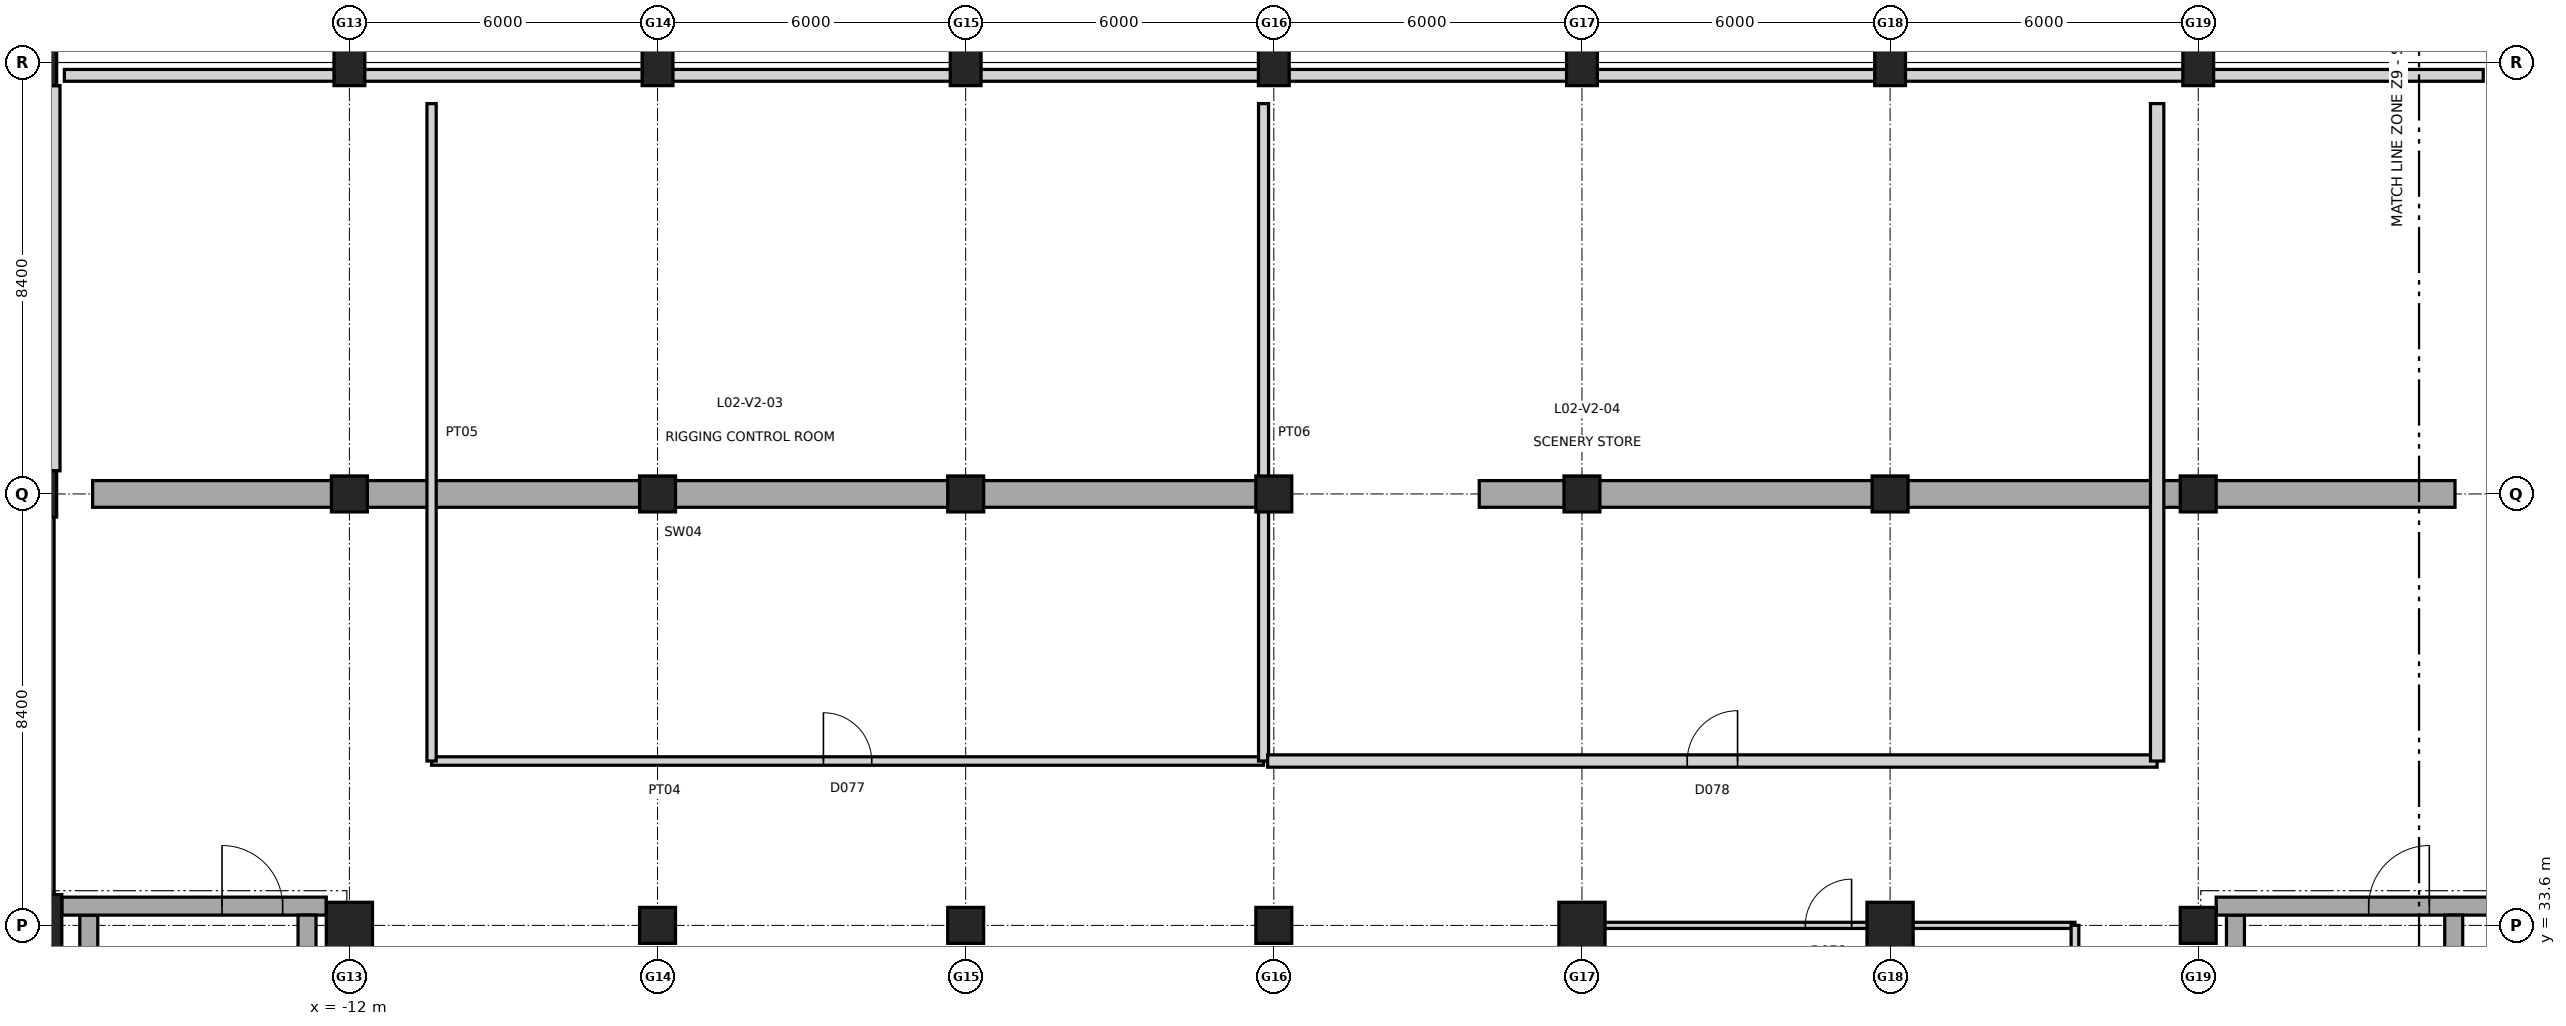
"""IFC4 building model, lengths in metres.
Left out: names, types, materials, properties, quantities, classifications, styles, units other than length and angle.
Written with IfcOpenShell. Run it as: python <this file> out.ifc"""

import sys

from ifc_helpers import new_model, si_unit, direction, frame, frame_2d, origin, origin_2d, place, context, subcontext, project, spatial, rectangle, extrude, element, fill, save


model = new_model("IFC4")
c1 = context("Model", 3, precision=1e-05, world=origin(), true_north=direction((0.0, 1.0)))
c2 = subcontext(c1, "Body", "Model", "MODEL_VIEW")
j1 = project(units=[si_unit("LENGTHUNIT", "METRE"), si_unit("PLANEANGLEUNIT", "RADIAN")], contexts=[c1])
p1 = place(None, origin())
s1 = spatial("IfcSite", under=j1, at=p1, CompositionType="ELEMENT")
p2 = place(p1, origin())
s2 = spatial("IfcBuilding", under=s1, at=p2, CompositionType="ELEMENT")
p3 = place(p2, frame((0.0, 0.0, 10.2)))
s3 = spatial("IfcBuildingStorey", under=s2, at=p3, CompositionType="ELEMENT", Elevation=10.2)
p4 = place(p3, frame((-18.0, 33.6, 0.0), z_axis=(0.0, 0.0, 1.0), x_axis=(1.0, 0.0, 0.0)))
e1 = element("IfcColumn", 1, at=p4, inside=s3, PredefinedType="COLUMN", context=c2, shape_type="SweptSolid", body=[
    extrude(rectangle(XDim=0.8, YDim=1.2, at=origin_2d()), origin(), (0.0, 0.0, 1.0), 4.8),
])
for number, where, z_axis, x_axis in (
    (2, (-18.0, 42.0, 0.0), (0.0, 0.0, 1.0), (1.0, 0.0, 0.0)),
    (3, (-18.0, 50.4, 0.0), (0.0, 0.0, 1.0), (1.0, 0.0, 0.0)),
):
    element("IfcColumn", number, at=place(p3, frame(where, z_axis=z_axis, x_axis=x_axis)), inside=s3, PredefinedType="COLUMN", context=c2, shape_type="SweptSolid", body=[
        extrude(rectangle(XDim=0.6, YDim=0.9, at=origin_2d()), origin(), (0.0, 0.0, 1.0), 4.8),
    ])
p5 = place(p3, frame((-12.0, 33.6, 0.0), z_axis=(0.0, 0.0, 1.0), x_axis=(1.0, 0.0, 0.0)))
e4 = element("IfcColumn", 4, at=p5, inside=s3, PredefinedType="COLUMN", context=c2, shape_type="SweptSolid", body=[
    extrude(rectangle(XDim=0.9, YDim=0.9, at=origin_2d()), origin(), (0.0, 0.0, 1.0), 4.8),
])
p6 = place(p3, frame((-12.0, 42.0, 0.0), z_axis=(0.0, 0.0, 1.0), x_axis=(1.0, 0.0, 0.0)))
e5 = element("IfcColumn", 5, at=p6, inside=s3, PredefinedType="COLUMN", context=c2, shape_type="SweptSolid", body=[
    extrude(rectangle(XDim=0.7, YDim=0.7, at=origin_2d()), origin(), (0.0, 0.0, 1.0), 4.8),
])
p7 = place(p3, frame((-12.0, 50.4, 0.0), z_axis=(0.0, 0.0, 1.0), x_axis=(1.0, 0.0, 0.0)))
e6 = element("IfcColumn", 6, at=p7, inside=s3, PredefinedType="COLUMN", context=c2, shape_type="SweptSolid", body=[
    extrude(rectangle(XDim=0.6, YDim=0.9, at=origin_2d()), origin(), (0.0, 0.0, 1.0), 4.8),
])
for number, where, z_axis, x_axis in (
    (7, (-6.0, 33.6, 0.0), (0.0, 0.0, 1.0), (1.0, 0.0, 0.0)),
    (8, (-6.0, 42.0, 0.0), (0.0, 0.0, 1.0), (1.0, 0.0, 0.0)),
):
    element("IfcColumn", number, at=place(p3, frame(where, z_axis=z_axis, x_axis=x_axis)), inside=s3, PredefinedType="COLUMN", context=c2, shape_type="SweptSolid", body=[
        extrude(rectangle(XDim=0.7, YDim=0.7, at=origin_2d()), origin(), (0.0, 0.0, 1.0), 4.8),
    ])
p8 = place(p3, frame((-6.0, 50.4, 0.0), z_axis=(0.0, 0.0, 1.0), x_axis=(1.0, 0.0, 0.0)))
e9 = element("IfcColumn", 9, at=p8, inside=s3, PredefinedType="COLUMN", context=c2, shape_type="SweptSolid", body=[
    extrude(rectangle(XDim=0.6, YDim=0.9, at=origin_2d()), origin(), (0.0, 0.0, 1.0), 4.8),
])
for number, where, z_axis, x_axis in (
    (10, (0.0, 33.6, 0.0), (0.0, 0.0, 1.0), (1.0, 0.0, 0.0)),
    (11, (0.0, 42.0, 0.0), (0.0, 0.0, 1.0), (1.0, 0.0, 0.0)),
):
    element("IfcColumn", number, at=place(p3, frame(where, z_axis=z_axis, x_axis=x_axis)), inside=s3, PredefinedType="COLUMN", context=c2, shape_type="SweptSolid", body=[
        extrude(rectangle(XDim=0.7, YDim=0.7, at=origin_2d()), origin(), (0.0, 0.0, 1.0), 4.8),
    ])
p9 = place(p3, frame((0.0, 50.4, 0.0), z_axis=(0.0, 0.0, 1.0), x_axis=(1.0, 0.0, 0.0)))
e12 = element("IfcColumn", 12, at=p9, inside=s3, PredefinedType="COLUMN", context=c2, shape_type="SweptSolid", body=[
    extrude(rectangle(XDim=0.6, YDim=0.9, at=origin_2d()), origin(), (0.0, 0.0, 1.0), 4.8),
])
for number, where, z_axis, x_axis in (
    (13, (6.0, 33.6, 0.0), (0.0, 0.0, 1.0), (1.0, 0.0, 0.0)),
    (14, (6.0, 42.0, 0.0), (0.0, 0.0, 1.0), (1.0, 0.0, 0.0)),
):
    element("IfcColumn", number, at=place(p3, frame(where, z_axis=z_axis, x_axis=x_axis)), inside=s3, PredefinedType="COLUMN", context=c2, shape_type="SweptSolid", body=[
        extrude(rectangle(XDim=0.7, YDim=0.7, at=origin_2d()), origin(), (0.0, 0.0, 1.0), 4.8),
    ])
p10 = place(p3, frame((6.0, 50.4, 0.0), z_axis=(0.0, 0.0, 1.0), x_axis=(1.0, 0.0, 0.0)))
e15 = element("IfcColumn", 15, at=p10, inside=s3, PredefinedType="COLUMN", context=c2, shape_type="SweptSolid", body=[
    extrude(rectangle(XDim=0.6, YDim=0.9, at=origin_2d()), origin(), (0.0, 0.0, 1.0), 4.8),
])
p11 = place(p3, frame((12.0, 33.6, 0.0), z_axis=(0.0, 0.0, 1.0), x_axis=(1.0, 0.0, 0.0)))
e16 = element("IfcColumn", 16, at=p11, inside=s3, PredefinedType="COLUMN", context=c2, shape_type="SweptSolid", body=[
    extrude(rectangle(XDim=0.9, YDim=0.9, at=origin_2d()), origin(), (0.0, 0.0, 1.0), 4.8),
])
p12 = place(p3, frame((12.0, 42.0, 0.0), z_axis=(0.0, 0.0, 1.0), x_axis=(1.0, 0.0, 0.0)))
e17 = element("IfcColumn", 17, at=p12, inside=s3, PredefinedType="COLUMN", context=c2, shape_type="SweptSolid", body=[
    extrude(rectangle(XDim=0.7, YDim=0.7, at=origin_2d()), origin(), (0.0, 0.0, 1.0), 4.8),
])
p13 = place(p3, frame((12.0, 50.4, 0.0), z_axis=(0.0, 0.0, 1.0), x_axis=(1.0, 0.0, 0.0)))
e18 = element("IfcColumn", 18, at=p13, inside=s3, PredefinedType="COLUMN", context=c2, shape_type="SweptSolid", body=[
    extrude(rectangle(XDim=0.6, YDim=0.9, at=origin_2d()), origin(), (0.0, 0.0, 1.0), 4.8),
])
p14 = place(p3, frame((18.0, 33.6, 0.0), z_axis=(0.0, 0.0, 1.0), x_axis=(1.0, 0.0, 0.0)))
e19 = element("IfcColumn", 19, at=p14, inside=s3, PredefinedType="COLUMN", context=c2, shape_type="SweptSolid", body=[
    extrude(rectangle(XDim=0.9, YDim=0.9, at=origin_2d()), origin(), (0.0, 0.0, 1.0), 4.8),
])
p15 = place(p3, frame((18.0, 42.0, 0.0), z_axis=(0.0, 0.0, 1.0), x_axis=(1.0, 0.0, 0.0)))
e20 = element("IfcColumn", 20, at=p15, inside=s3, PredefinedType="COLUMN", context=c2, shape_type="SweptSolid", body=[
    extrude(rectangle(XDim=0.7, YDim=0.7, at=origin_2d()), origin(), (0.0, 0.0, 1.0), 4.8),
])
p16 = place(p3, frame((18.0, 50.4, 0.0), z_axis=(0.0, 0.0, 1.0), x_axis=(1.0, 0.0, 0.0)))
e21 = element("IfcColumn", 21, at=p16, inside=s3, PredefinedType="COLUMN", context=c2, shape_type="SweptSolid", body=[
    extrude(rectangle(XDim=0.6, YDim=0.9, at=origin_2d()), origin(), (0.0, 0.0, 1.0), 4.8),
])
for number, where, z_axis, x_axis in (
    (22, (24.0, 33.6, 0.0), (0.0, 0.0, 1.0), (1.0, 0.0, 0.0)),
    (23, (24.0, 42.0, 0.0), (0.0, 0.0, 1.0), (1.0, 0.0, 0.0)),
):
    element("IfcColumn", number, at=place(p3, frame(where, z_axis=z_axis, x_axis=x_axis)), inside=s3, PredefinedType="COLUMN", context=c2, shape_type="SweptSolid", body=[
        extrude(rectangle(XDim=0.7, YDim=0.7, at=origin_2d()), origin(), (0.0, 0.0, 1.0), 4.8),
    ])
p17 = place(p3, frame((24.0, 50.4, 0.0), z_axis=(0.0, 0.0, 1.0), x_axis=(1.0, 0.0, 0.0)))
e24 = element("IfcColumn", 24, at=p17, inside=s3, PredefinedType="COLUMN", context=c2, shape_type="SweptSolid", body=[
    extrude(rectangle(XDim=0.6, YDim=0.9, at=origin_2d()), origin(), (0.0, 0.0, 1.0), 4.8),
])
p18 = place(p3, frame((-18.0, 18.0, 0.0), z_axis=(0.0, 0.0, 1.0), x_axis=(0.0, 1.0, 0.0)))
e25 = element("IfcWall", 25, at=p18, inside=s3, PredefinedType="SHEAR", context=c2, shape_type="SweptSolid", body=[
    extrude(rectangle(XDim=31.95, YDim=0.5, at=frame_2d((15.975, 0.0))), origin(), (0.0, 0.0, 1.0), 4.8),
])
p19 = place(p3, frame((-17.0, 42.0, 0.0), z_axis=(0.0, 0.0, 1.0), x_axis=(1.0, 0.0, 0.0)))
e26 = element("IfcWall", 26, at=p19, inside=s3, PredefinedType="SHEAR", context=c2, shape_type="SweptSolid", body=[
    extrude(rectangle(XDim=23.0, YDim=0.52, at=frame_2d((11.5, 0.0))), origin(), (0.0, 0.0, 1.0), 4.8),
])
p20 = place(p3, frame((10.0, 42.0, 0.0), z_axis=(0.0, 0.0, 1.0), x_axis=(1.0, 0.0, 0.0)))
e27 = element("IfcWall", 27, at=p20, inside=s3, PredefinedType="SHEAR", context=c2, shape_type="SweptSolid", body=[
    extrude(rectangle(XDim=19.0, YDim=0.52, at=frame_2d((9.5, 0.0))), origin(), (0.0, 0.0, 1.0), 4.8),
])
p21 = place(p3, frame((29.55, 50.15, 4.8), z_axis=(0.0, 0.0, 1.0), x_axis=(-1.0, 0.0, 0.0)))
e28 = element("IfcWall", 28, at=p21, inside=s3, PredefinedType="PARAPET", context=c2, shape_type="SweptSolid", body=[
    extrude(rectangle(XDim=47.1, YDim=0.23, at=frame_2d((23.55, 0.0))), origin(), (0.0, 0.0, 1.0), 1.15),
])
p22 = place(p3, frame((-17.75, 49.95, 4.8), z_axis=(0.0, 0.0, 1.0), x_axis=(0.0, -1.0, 0.0)))
e29 = element("IfcWall", 29, at=p22, inside=s3, PredefinedType="PARAPET", context=c2, shape_type="SweptSolid", body=[
    extrude(rectangle(XDim=7.5, YDim=0.23, at=frame_2d((3.75, 0.0))), origin(), (0.0, 0.0, 1.0), 1.15),
])
p23 = place(p3, frame((-17.075, 25.5, 0.0), z_axis=(0.0, 0.0, 1.0), x_axis=(0.0, 1.0, 0.0)))
e30 = element("IfcWall", 30, at=p23, inside=s3, PredefinedType="SHEAR", context=c2, shape_type="SweptSolid", body=[
    extrude(rectangle(XDim=8.3, YDim=0.35, at=frame_2d((4.15, 0.0))), origin(), (0.0, 0.0, 1.0), 4.8),
])
p24 = place(p3, frame((-17.6, 33.975, 0.0), z_axis=(0.0, 0.0, 1.0), x_axis=(1.0, 0.0, 0.0)))
e31 = element("IfcWall", 31, at=p24, inside=s3, PredefinedType="SHEAR", context=c2, shape_type="SweptSolid", body=[
    extrude(rectangle(XDim=5.15, YDim=0.35, at=frame_2d((2.575, 0.0))), origin(), (0.0, 0.0, 1.0), 4.8),
])
p25 = place(p24, frame((3.12, 0.0, 0.0)))
e32 = element("IfcOpeningElement", 32, at=p25, cuts=e31, PredefinedType="OPENING", context=c2, shape_type="SweptSolid", body=[
    extrude(rectangle(XDim=1.18, YDim=2.15, at=frame_2d((0.59, 1.075))), frame((0.0, 0.185, 0.0), z_axis=(0.0, -1.0, 0.0), x_axis=(1.0, 0.0, 0.0)), (0.0, 0.0, 1.0), 0.37),
])
for number, where, z_axis, x_axis in (
    (33, (-12.825, 33.8, 0.0), (0.0, 0.0, 1.0), (0.0, -1.0, 0.0)),
    (34, (24.725, 25.5, 0.0), (0.0, 0.0, 1.0), (0.0, 1.0, 0.0)),
):
    element("IfcWall", number, at=place(p3, frame(where, z_axis=z_axis, x_axis=x_axis)), inside=s3, PredefinedType="SHEAR", context=c2, shape_type="SweptSolid", body=[
        extrude(rectangle(XDim=8.3, YDim=0.35, at=frame_2d((4.15, 0.0))), origin(), (0.0, 0.0, 1.0), 4.8),
    ])
p26 = place(p3, frame((24.35, 33.975, 0.0), z_axis=(0.0, 0.0, 1.0), x_axis=(1.0, 0.0, 0.0)))
e35 = element("IfcWall", 35, at=p26, inside=s3, PredefinedType="SHEAR", context=c2, shape_type="SweptSolid", body=[
    extrude(rectangle(XDim=5.35, YDim=0.35, at=frame_2d((2.675, 0.0))), origin(), (0.0, 0.0, 1.0), 4.8),
])
p27 = place(p26, frame((2.97, 0.0, 0.0)))
e36 = element("IfcOpeningElement", 36, at=p27, cuts=e35, PredefinedType="OPENING", context=c2, shape_type="SweptSolid", body=[
    extrude(rectangle(XDim=1.18, YDim=2.15, at=frame_2d((0.59, 1.075))), frame((0.0, 0.185, 0.0), z_axis=(0.0, -1.0, 0.0), x_axis=(1.0, 0.0, 0.0)), (0.0, 0.0, 1.0), 0.37),
])
p28 = place(p3, frame((28.975, 33.8, 0.0), z_axis=(0.0, 0.0, 1.0), x_axis=(0.0, -1.0, 0.0)))
e37 = element("IfcWall", 37, at=p28, inside=s3, PredefinedType="SHEAR", context=c2, shape_type="SweptSolid", body=[
    extrude(rectangle(XDim=8.3, YDim=0.35, at=frame_2d((4.15, 0.0))), origin(), (0.0, 0.0, 1.0), 4.8),
])
p29 = place(p3, frame((12.0, 33.6, 0.0), z_axis=(0.0, 0.0, 1.0), x_axis=(1.0, 0.0, 0.0)))
e38 = element("IfcWall", 38, at=p29, inside=s3, PredefinedType="PARTITIONING", context=c2, shape_type="SweptSolid", body=[
    extrude(rectangle(XDim=9.6, YDim=0.12, at=frame_2d((4.8, 0.0))), origin(), (0.0, 0.0, 1.0), 3.812),
])
p30 = place(p29, frame((4.35, 0.0, 0.0)))
e39 = element("IfcOpeningElement", 39, at=p30, cuts=e38, PredefinedType="OPENING", context=c2, shape_type="SweptSolid", body=[
    extrude(rectangle(XDim=0.9, YDim=2.1, at=frame_2d((0.45, 1.05))), frame((0.0, 0.07, 0.0), z_axis=(0.0, -1.0, 0.0), x_axis=(1.0, 0.0, 0.0)), (0.0, 0.0, 1.0), 0.14),
])
p31 = place(p3, frame((12.0, 24.2, 0.0), z_axis=(0.0, 0.0, 1.0), x_axis=(0.0, 1.0, 0.0)))
e40 = element("IfcWall", 40, at=p31, inside=s3, PredefinedType="PARTITIONING", context=c2, shape_type="SweptSolid", body=[
    extrude(rectangle(XDim=9.4, YDim=0.135, at=frame_2d((4.7, 0.0))), origin(), (0.0, 0.0, 1.0), 3.734),
])
p32 = place(p3, frame((21.6, 24.2, 0.0), z_axis=(0.0, 0.0, 1.0), x_axis=(0.0, 1.0, 0.0)))
e41 = element("IfcWall", 41, at=p32, inside=s3, PredefinedType="PARTITIONING", context=c2, shape_type="SweptSolid", body=[
    extrude(rectangle(XDim=9.4, YDim=0.15, at=frame_2d((4.7, 0.0))), origin(), (0.0, 0.0, 1.0), 4.42),
])
p33 = place(p3, frame((-10.4, 36.8, 0.0), z_axis=(0.0, 0.0, 1.0), x_axis=(1.0, 0.0, 0.0)))
e42 = element("IfcWall", 42, at=p33, inside=s3, PredefinedType="PARTITIONING", context=c2, shape_type="SweptSolid", body=[
    extrude(rectangle(XDim=16.2, YDim=0.165, at=frame_2d((8.1, 0.0))), origin(), (0.0, 0.0, 1.0), 4.42),
])
p34 = place(p33, frame((7.63, 0.0, 0.0)))
e43 = element("IfcOpeningElement", 43, at=p34, cuts=e42, PredefinedType="OPENING", context=c2, shape_type="SweptSolid", body=[
    extrude(rectangle(XDim=0.94, YDim=2.1, at=frame_2d((0.47, 1.05))), frame((0.0, 0.093, 0.0), z_axis=(0.0, -1.0, 0.0), x_axis=(1.0, 0.0, 0.0)), (0.0, 0.0, 1.0), 0.185),
])
p35 = place(p3, frame((-10.4, 36.8, 0.0), z_axis=(0.0, 0.0, 1.0), x_axis=(0.0, 1.0, 0.0)))
e44 = element("IfcWall", 44, at=p35, inside=s3, PredefinedType="PARTITIONING", context=c2, shape_type="SweptSolid", body=[
    extrude(rectangle(XDim=12.8, YDim=0.18, at=frame_2d((6.4, 0.0))), origin(), (0.0, 0.0, 1.0), 4.42),
])
p36 = place(p3, frame((5.8, 36.8, 0.0), z_axis=(0.0, 0.0, 1.0), x_axis=(0.0, 1.0, 0.0)))
e45 = element("IfcWall", 45, at=p36, inside=s3, PredefinedType="PARTITIONING", context=c2, shape_type="SweptSolid", body=[
    extrude(rectangle(XDim=12.8, YDim=0.195, at=frame_2d((6.4, 0.0))), origin(), (0.0, 0.0, 1.0), 3.59),
])
p37 = place(p3, frame((5.88, 36.8, 0.0), z_axis=(0.0, 0.0, 1.0), x_axis=(1.0, 0.0, 0.0)))
e46 = element("IfcWall", 46, at=p37, inside=s3, PredefinedType="PARTITIONING", context=c2, shape_type="SweptSolid", body=[
    extrude(rectangle(XDim=17.32, YDim=0.24, at=frame_2d((8.66, 0.0))), origin(), (0.0, 0.0, 1.0), 4.42),
])
p38 = place(p37, frame((8.17, 0.0, 0.0)))
e47 = element("IfcOpeningElement", 47, at=p38, cuts=e46, PredefinedType="OPENING", context=c2, shape_type="SweptSolid", body=[
    extrude(rectangle(XDim=0.98, YDim=2.15, at=frame_2d((0.49, 1.075))), frame((0.0, 0.13, 0.0), z_axis=(0.0, -1.0, 0.0), x_axis=(1.0, 0.0, 0.0)), (0.0, 0.0, 1.0), 0.26),
])
p39 = place(p3, frame((23.2, 36.8, 0.0), z_axis=(0.0, 0.0, 1.0), x_axis=(0.0, 1.0, 0.0)))
e48 = element("IfcWall", 48, at=p39, inside=s3, PredefinedType="PARTITIONING", context=c2, shape_type="SweptSolid", body=[
    extrude(rectangle(XDim=12.8, YDim=0.26, at=frame_2d((6.4, 0.0))), origin(), (0.0, 0.0, 1.0), 4.42),
])
p40 = place(p2, frame((0.0, 0.0, 41.4)))
p41 = place(p40, frame((0.0, 0.0, -26.675)))
p42 = place(p41, frame((-2.0, 46.2, 0.0)))
p43 = place(p42, frame((0.0, 0.0, 0.225)))
e49 = element("IfcWindow", 49, at=p43, inside=s3, PartitioningType="SINGLE_PANEL", PredefinedType="SKYLIGHT", context=c2, shape_type="SweptSolid", body=[
    extrude(rectangle(XDim=2.4, YDim=2.4, at=origin_2d()), origin(), (0.0, 0.0, 1.0), 0.05),
])
p44 = place(p41, frame((14.0, 46.2, 0.0)))
p45 = place(p44, frame((0.0, 0.0, 0.225)))
e50 = element("IfcWindow", 50, at=p45, inside=s3, PartitioningType="SINGLE_PANEL", PredefinedType="SKYLIGHT", context=c2, shape_type="SweptSolid", body=[
    extrude(rectangle(XDim=1.3, YDim=1.3, at=origin_2d()), origin(), (0.0, 0.0, 1.0), 0.05),
])
p46 = place(p25, origin())
e51 = element("IfcDoor", 51, at=p46, inside=s3, OperationType="SINGLE_SWING_LEFT", PredefinedType="DOOR", context=c2, shape_type="SweptSolid", body=[
    extrude(rectangle(XDim=1.18, YDim=2.15, at=frame_2d((0.59, 1.075))), frame((0.0, 0.025, 0.0), z_axis=(0.0, -1.0, 0.0), x_axis=(1.0, 0.0, 0.0)), (0.0, 0.0, 1.0), 0.05),
])
fill(e32, e51)
p47 = place(p27, origin())
e52 = element("IfcDoor", 52, at=p47, inside=s3, OperationType="SINGLE_SWING_RIGHT", PredefinedType="DOOR", context=c2, shape_type="SweptSolid", body=[
    extrude(rectangle(XDim=1.18, YDim=2.15, at=frame_2d((0.59, 1.075))), frame((0.0, 0.025, 0.0), z_axis=(0.0, -1.0, 0.0), x_axis=(1.0, 0.0, 0.0)), (0.0, 0.0, 1.0), 0.05),
])
fill(e36, e52)
p48 = place(p30, origin())
e53 = element("IfcDoor", 53, at=p48, inside=s3, OperationType="SINGLE_SWING_RIGHT", PredefinedType="DOOR", context=c2, shape_type="SweptSolid", body=[
    extrude(rectangle(XDim=0.9, YDim=2.1, at=frame_2d((0.45, 1.05))), frame((0.0, 0.025, 0.0), z_axis=(0.0, -1.0, 0.0), x_axis=(1.0, 0.0, 0.0)), (0.0, 0.0, 1.0), 0.05),
])
fill(e39, e53)
p49 = place(p34, origin())
e54 = element("IfcDoor", 54, at=p49, inside=s3, OperationType="SINGLE_SWING_LEFT", PredefinedType="DOOR", context=c2, shape_type="SweptSolid", body=[
    extrude(rectangle(XDim=0.94, YDim=2.1, at=frame_2d((0.47, 1.05))), frame((0.0, 0.025, 0.0), z_axis=(0.0, -1.0, 0.0), x_axis=(1.0, 0.0, 0.0)), (0.0, 0.0, 1.0), 0.05),
])
fill(e43, e54)
p50 = place(p38, origin())
e55 = element("IfcDoor", 55, at=p50, inside=s3, OperationType="SINGLE_SWING_RIGHT", PredefinedType="DOOR", context=c2, shape_type="SweptSolid", body=[
    extrude(rectangle(XDim=0.98, YDim=2.15, at=frame_2d((0.49, 1.075))), frame((0.0, 0.025, 0.0), z_axis=(0.0, -1.0, 0.0), x_axis=(1.0, 0.0, 0.0)), (0.0, 0.0, 1.0), 0.05),
])
fill(e47, e55)
save(model, sys.argv[1])
